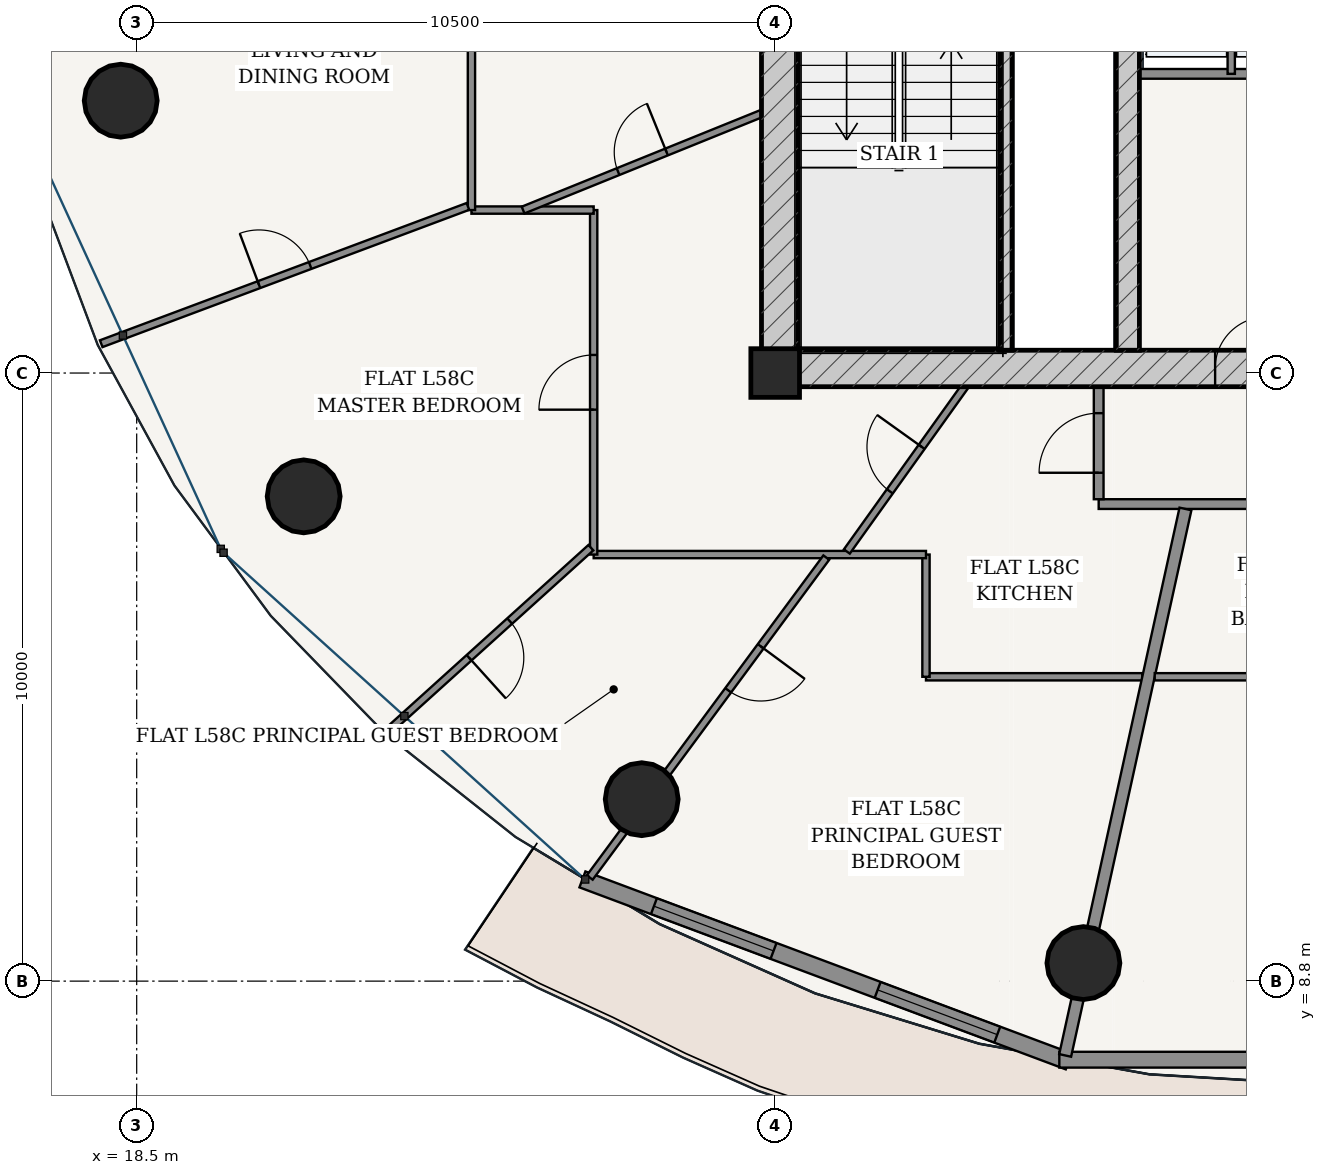
"""IFC4 building model, lengths in metres.
Left out: names, types, materials, properties, quantities, classifications, styles, units other than length and angle.
Written with IfcOpenShell. Run it as: python <this file> out.ifc"""

import sys

from ifc_helpers import new_model, si_unit, direction, frame, frame_2d, origin, origin_2d, place, context, subcontext, project, spatial, rectangle, hollow_circle, extrude, source, transform, mapped, element, fill, save


model = new_model("IFC4")
c1 = context("Model", 3, precision=1e-05, world=origin(), true_north=direction((-0.2419218956, 0.970295726276)))
c2 = subcontext(c1, "Body", "Model", "MODEL_VIEW")
j1 = project(units=[si_unit("LENGTHUNIT", "METRE"), si_unit("PLANEANGLEUNIT", "RADIAN")], contexts=[c1])
p1 = place(None, origin())
s1 = spatial("IfcSite", under=j1, at=p1, CompositionType="ELEMENT")
p2 = place(p1, origin())
s2 = spatial("IfcBuilding", under=s1, at=p2, CompositionType="ELEMENT")
p3 = place(p2, frame((0.0, 0.0, 220.8)))
s3 = spatial("IfcBuildingStorey", under=s2, at=p3, CompositionType="ELEMENT", Elevation=220.8)
p4 = place(p3, frame((29.0, 18.8, 0.0), z_axis=(0.0, 0.0, 1.0), x_axis=(1.0, 0.0, 0.0)))
e1 = element("IfcColumn", 1, at=p4, inside=s3, PredefinedType="COLUMN", context=c2, shape_type="SweptSolid", body=[
    extrude(rectangle(XDim=0.8, YDim=0.8, at=origin_2d()), origin(), (0.0, 0.0, 1.0), 3.7),
])
p5 = place(p3, frame((28.775, 18.875, 0.0), z_axis=(0.0, 0.0, 1.0), x_axis=(1.0, 0.0, 0.0)))
e2 = element("IfcWall", 2, at=p5, inside=s3, PredefinedType="SHEAR", context=c2, shape_type="SweptSolid", body=[
    extrude(rectangle(XDim=18.45, YDim=0.6, at=frame_2d((9.225, 0.0))), origin(), (0.0, 0.0, 1.0), 3.435),
])
p6 = place(p5, frame((7.46, 0.0, 0.0)))
e3 = element("IfcOpeningElement", 3, at=p6, cuts=e2, PredefinedType="OPENING", context=c2, shape_type="SweptSolid", body=[
    extrude(rectangle(XDim=0.85, YDim=2.1, at=frame_2d((0.425, 1.05))), frame((0.0, 0.31, 0.0), z_axis=(0.0, -1.0, 0.0), x_axis=(1.0, 0.0, 0.0)), (0.0, 0.0, 1.0), 0.62),
])
p7 = place(p5, frame((10.54, 0.0, 0.0)))
e4 = element("IfcOpeningElement", 4, at=p7, cuts=e2, PredefinedType="OPENING", context=c2, shape_type="SweptSolid", body=[
    extrude(rectangle(XDim=0.85, YDim=2.1, at=frame_2d((0.425, 1.05))), frame((0.0, 0.31, 0.0), z_axis=(0.0, -1.0, 0.0), x_axis=(1.0, 0.0, 0.0)), (0.0, 0.0, 1.0), 0.62),
])
p8 = place(p3, frame((29.075, 19.175, 0.0), z_axis=(0.0, 0.0, 1.0), x_axis=(0.0, 1.0, 0.0)))
e5 = element("IfcWall", 5, at=p8, inside=s3, PredefinedType="SHEAR", context=c2, shape_type="SweptSolid", body=[
    extrude(rectangle(XDim=15.25, YDim=0.6, at=frame_2d((7.625, 0.0))), origin(), (0.0, 0.0, 1.0), 3.435),
])
p9 = place(p8, frame((9.875, 0.0, 0.0)))
e6 = element("IfcOpeningElement", 6, at=p9, cuts=e5, PredefinedType="OPENING", context=c2, shape_type="SweptSolid", body=[
    extrude(rectangle(XDim=1.5, YDim=2.2, at=frame_2d((0.75, 1.1))), frame((0.0, 0.31, 0.0), z_axis=(0.0, -1.0, 0.0), x_axis=(1.0, 0.0, 0.0)), (0.0, 0.0, 1.0), 0.62),
])
p10 = place(p3, frame((32.795, 19.175, 0.0), z_axis=(0.0, 0.0, 1.0), x_axis=(0.0, 1.0, 0.0)))
e7 = element("IfcWall", 7, at=p10, inside=s3, PredefinedType="SOLIDWALL", context=c2, shape_type="SweptSolid", body=[
    extrude(rectangle(XDim=7.375, YDim=0.2, at=frame_2d((3.688, 0.0))), origin(), (0.0, 0.0, 1.0), 3.435),
])
p11 = place(p3, frame((34.8, 19.175, 0.0), z_axis=(0.0, 0.0, 1.0), x_axis=(0.0, 1.0, 0.0)))
e8 = element("IfcWall", 8, at=p11, inside=s3, PredefinedType="SHEAR", context=c2, shape_type="SweptSolid", body=[
    extrude(rectangle(XDim=15.25, YDim=0.38, at=frame_2d((7.625, 0.0))), origin(), (0.0, 0.0, 1.0), 3.435),
])
p12 = place(p11, frame((7.8, 0.0, 0.0)))
e9 = element("IfcOpeningElement", 9, at=p12, cuts=e8, PredefinedType="OPENING", context=c2, shape_type="SweptSolid", body=[
    extrude(rectangle(XDim=1.05, YDim=2.15, at=frame_2d((0.525, 1.075))), frame((0.0, 0.2, 0.0), z_axis=(0.0, -1.0, 0.0), x_axis=(1.0, 0.0, 0.0)), (0.0, 0.0, 1.0), 0.4),
])
for number, where, z_axis, x_axis in (
    (10, (18.237, 23.279, 0.0), (0.0, 0.0, 1.0), (1.0, 0.0, 0.0)),
    (11, (21.246, 16.772, 0.0), (0.0, 0.0, 1.0), (1.0, 0.0, 0.0)),
    (12, (26.805, 11.792, 0.0), (0.0, 0.0, 1.0), (1.0, 0.0, 0.0)),
    (13, (34.069, 9.097, 0.0), (0.0, 0.0, 1.0), (1.0, 0.0, 0.0)),
):
    element("IfcColumn", number, at=place(p3, frame(where, z_axis=z_axis, x_axis=x_axis)), inside=s3, PredefinedType="COLUMN", context=c2, shape_type="SweptSolid", body=[
        extrude(hollow_circle(Radius=0.6, WallThickness=0.038, at=origin_2d()), origin(), (0.0, 0.0, 1.0), 3.7),
    ])
p13 = place(p3, frame((25.83, 10.473, 0.0), z_axis=(0.0, 0.0, 1.0), x_axis=(0.936556918375, -0.350515532672, 0.0)))
e14 = element("IfcWall", 14, at=p13, inside=s3, PredefinedType="SOLIDWALL", context=c2, shape_type="SweptSolid", body=[
    extrude(rectangle(XDim=8.539, YDim=0.28, at=frame_2d((4.27, 0.0))), origin(), (0.0, 0.0, 1.0), 3.435),
])
p14 = place(p13, frame((1.256, 0.0, 0.85)))
e15 = element("IfcOpeningElement", 15, at=p14, cuts=e14, PredefinedType="OPENING", context=c2, shape_type="SweptSolid", body=[
    extrude(rectangle(XDim=2.1, YDim=1.95, at=frame_2d((1.05, 0.975))), frame((0.0, 0.15, 0.0), z_axis=(0.0, -1.0, 0.0), x_axis=(1.0, 0.0, 0.0)), (0.0, 0.0, 1.0), 0.3),
])
p15 = place(p13, frame((5.184, 0.0, 0.85)))
e16 = element("IfcOpeningElement", 16, at=p15, cuts=e14, PredefinedType="OPENING", context=c2, shape_type="SweptSolid", body=[
    extrude(rectangle(XDim=2.1, YDim=1.95, at=frame_2d((1.05, 0.975))), frame((0.0, 0.15, 0.0), z_axis=(0.0, -1.0, 0.0), x_axis=(1.0, 0.0, 0.0)), (0.0, 0.0, 1.0), 0.3),
])
p16 = place(p3, frame((33.673, 7.508, 0.0), z_axis=(0.0, 0.0, 1.0), x_axis=(1.0, 0.0, 0.0)))
e17 = element("IfcWall", 17, at=p16, inside=s3, PredefinedType="SOLIDWALL", context=c2, shape_type="SweptSolid", body=[
    extrude(rectangle(XDim=8.654, YDim=0.26, at=frame_2d((4.327, 0.0))), origin(), (0.0, 0.0, 1.0), 3.435),
])
p17 = place(p16, frame((3.652, 0.0, 0.0)))
e18 = element("IfcOpeningElement", 18, at=p17, cuts=e17, PredefinedType="OPENING", context=c2, shape_type="SweptSolid", body=[
    extrude(rectangle(XDim=1.35, YDim=2.2, at=frame_2d((0.675, 1.1))), frame((0.0, 0.14, 0.0), z_axis=(0.0, -1.0, 0.0), x_axis=(1.0, 0.0, 0.0)), (0.0, 0.0, 1.0), 0.28),
])
p18 = place(p3, frame((34.99, 23.72, 0.0), z_axis=(0.0, 0.0, 1.0), x_axis=(1.0, 0.0, 0.0)))
e19 = element("IfcWall", 19, at=p18, inside=s3, PredefinedType="PARTITIONING", context=c2, shape_type="SweptSolid", body=[
    extrude(rectangle(XDim=6.02, YDim=0.16, at=frame_2d((3.01, 0.0))), origin(), (0.0, 0.0, 1.0), 3.435),
])
p19 = place(p3, frame((36.5, 23.72, 0.0), z_axis=(0.0, 0.0, 1.0), x_axis=(0.0, 1.0, 0.0)))
e20 = element("IfcWall", 20, at=p19, inside=s3, PredefinedType="PARTITIONING", context=c2, shape_type="SweptSolid", body=[
    extrude(rectangle(XDim=2.56, YDim=0.12, at=frame_2d((1.28, 0.0))), origin(), (0.0, 0.0, 1.0), 3.435),
])
p20 = place(p3, frame((34.32, 16.645, 0.0), z_axis=(0.0, 0.0, 1.0), x_axis=(1.0, 0.0, 0.0)))
e21 = element("IfcWall", 21, at=p20, inside=s3, PredefinedType="PARTITIONING", context=c2, shape_type="SweptSolid", body=[
    extrude(rectangle(XDim=14.835, YDim=0.16, at=frame_2d((7.417, 0.0))), origin(), (0.0, 0.0, 1.0), 2.951),
])
p21 = place(p20, frame((8.973, 0.0, 0.0)))
e22 = element("IfcOpeningElement", 22, at=p21, cuts=e21, PredefinedType="OPENING", context=c2, shape_type="SweptSolid", body=[
    extrude(rectangle(XDim=0.98, YDim=2.2, at=frame_2d((0.49, 1.1))), frame((0.0, 0.09, 0.0), z_axis=(0.0, -1.0, 0.0), x_axis=(1.0, 0.0, 0.0)), (0.0, 0.0, 1.0), 0.18),
])
p22 = place(p3, frame((34.32, 16.725, 0.0), z_axis=(0.0, 0.0, 1.0), x_axis=(0.0, 1.0, 0.0)))
e23 = element("IfcWall", 23, at=p22, inside=s3, PredefinedType="PARTITIONING", context=c2, shape_type="SweptSolid", body=[
    extrude(rectangle(XDim=1.85, YDim=0.16, at=frame_2d((0.925, 0.0))), origin(), (0.0, 0.0, 1.0), 3.435),
])
p23 = place(p22, frame((0.435, 0.0, 0.0)))
e24 = element("IfcOpeningElement", 24, at=p23, cuts=e23, PredefinedType="OPENING", context=c2, shape_type="SweptSolid", body=[
    extrude(rectangle(XDim=0.98, YDim=2.2, at=frame_2d((0.49, 1.1))), frame((0.0, 0.09, 0.0), z_axis=(0.0, -1.0, 0.0), x_axis=(1.0, 0.0, 0.0)), (0.0, 0.0, 1.0), 0.18),
])
p24 = place(p3, frame((35.038, 13.805, 0.0), z_axis=(0.0, 0.0, 1.0), x_axis=(-1.0, 0.0, 0.0)))
e25 = element("IfcWall", 25, at=p24, inside=s3, PredefinedType="PARTITIONING", context=c2, shape_type="SweptSolid", body=[
    extrude(rectangle(XDim=3.558, YDim=0.12, at=frame_2d((1.779, 0.0))), origin(), (0.0, 0.0, 1.0), 2.951),
])
p25 = place(p3, frame((31.48, 13.805, 0.0), z_axis=(0.0, 0.0, 1.0), x_axis=(0.0, 1.0, 0.0)))
e26 = element("IfcWall", 26, at=p25, inside=s3, PredefinedType="PARTITIONING", context=c2, shape_type="SweptSolid", body=[
    extrude(rectangle(XDim=2.01, YDim=0.12, at=frame_2d((1.005, 0.0))), origin(), (0.0, 0.0, 1.0), 3.11),
])
p26 = place(p3, frame((31.48, 15.815, 0.0), z_axis=(0.0, 0.0, 1.0), x_axis=(-1.0, 0.0, 0.0)))
e27 = element("IfcWall", 27, at=p26, inside=s3, PredefinedType="PARTITIONING", context=c2, shape_type="SweptSolid", body=[
    extrude(rectangle(XDim=5.465, YDim=0.12, at=frame_2d((2.732, 0.0))), origin(), (0.0, 0.0, 1.0), 2.951),
])
p27 = place(p3, frame((26.015, 15.815, 0.0), z_axis=(0.0, 0.0, 1.0), x_axis=(0.0, 1.0, 0.0)))
e28 = element("IfcWall", 28, at=p27, inside=s3, PredefinedType="PARTITIONING", context=c2, shape_type="SweptSolid", body=[
    extrude(rectangle(XDim=5.665, YDim=0.12, at=frame_2d((2.833, 0.0))), origin(), (0.0, 0.0, 1.0), 2.951),
])
p28 = place(p27, frame((2.383, 0.0, 0.0)))
e29 = element("IfcOpeningElement", 29, at=p28, cuts=e28, PredefinedType="OPENING", context=c2, shape_type="SweptSolid", body=[
    extrude(rectangle(XDim=0.9, YDim=2.15, at=frame_2d((0.45, 1.075))), frame((0.0, 0.07, 0.0), z_axis=(0.0, -1.0, 0.0), x_axis=(1.0, 0.0, 0.0)), (0.0, 0.0, 1.0), 0.14),
])
p29 = place(p3, frame((26.015, 21.48, 0.0), z_axis=(0.0, 0.0, 1.0), x_axis=(-1.0, 0.0, 0.0)))
e30 = element("IfcWall", 30, at=p29, inside=s3, PredefinedType="PARTITIONING", context=c2, shape_type="SweptSolid", body=[
    extrude(rectangle(XDim=2.01, YDim=0.12, at=frame_2d((1.005, 0.0))), origin(), (0.0, 0.0, 1.0), 3.11),
])
p30 = place(p3, frame((24.005, 21.48, 0.0), z_axis=(0.0, 0.0, 1.0), x_axis=(0.0, 1.0, 0.0)))
e31 = element("IfcWall", 31, at=p30, inside=s3, PredefinedType="PARTITIONING", context=c2, shape_type="SweptSolid", body=[
    extrude(rectangle(XDim=5.218, YDim=0.12, at=frame_2d((2.609, 0.0))), origin(), (0.0, 0.0, 1.0), 2.951),
])
p31 = place(p3, frame((23.947, 21.54, 0.0), z_axis=(0.0, 0.0, 1.0), x_axis=(-0.936534700322, -0.350574892274, 0.0)))
e32 = element("IfcWall", 32, at=p31, inside=s3, PredefinedType="PARTITIONING", context=c2, shape_type="SweptSolid", body=[
    extrude(rectangle(XDim=6.439, YDim=0.12, at=frame_2d((3.219, 0.0))), origin(), (0.0, 0.0, 1.0), 2.951),
])
p32 = place(p31, frame((2.769, 0.0, 0.0)))
e33 = element("IfcOpeningElement", 33, at=p32, cuts=e32, PredefinedType="OPENING", context=c2, shape_type="SweptSolid", body=[
    extrude(rectangle(XDim=0.9, YDim=2.15, at=frame_2d((0.45, 1.075))), frame((0.0, 0.07, 0.0), z_axis=(0.0, -1.0, 0.0), x_axis=(1.0, 0.0, 0.0)), (0.0, 0.0, 1.0), 0.14),
])
p33 = place(p3, frame((25.969, 15.928, 0.0), z_axis=(0.0, 0.0, 1.0), x_axis=(-0.741935446671, -0.670471321514, 0.0)))
e34 = element("IfcWall", 34, at=p33, inside=s3, PredefinedType="PARTITIONING", context=c2, shape_type="SweptSolid", body=[
    extrude(rectangle(XDim=4.499, YDim=0.12, at=frame_2d((2.25, 0.0))), origin(), (0.0, 0.0, 1.0), 2.951),
])
p34 = place(p33, frame((1.8, 0.0, 0.0)))
e35 = element("IfcOpeningElement", 35, at=p34, cuts=e34, PredefinedType="OPENING", context=c2, shape_type="SweptSolid", body=[
    extrude(rectangle(XDim=0.9, YDim=2.15, at=frame_2d((0.45, 1.075))), frame((0.0, 0.07, 0.0), z_axis=(0.0, -1.0, 0.0), x_axis=(1.0, 0.0, 0.0)), (0.0, 0.0, 1.0), 0.14),
])
p35 = place(p3, frame((29.841, 15.765, 0.0), z_axis=(0.0, 0.0, 1.0), x_axis=(-0.594535821787, -0.804069124275, 0.0)))
e36 = element("IfcWall", 36, at=p35, inside=s3, PredefinedType="PARTITIONING", context=c2, shape_type="SweptSolid", body=[
    extrude(rectangle(XDim=6.543, YDim=0.12, at=frame_2d((3.272, 0.0))), origin(), (0.0, 0.0, 1.0), 2.951),
])
p36 = place(p35, frame((1.814, 0.0, 0.0)))
e37 = element("IfcOpeningElement", 37, at=p36, cuts=e36, PredefinedType="OPENING", context=c2, shape_type="SweptSolid", body=[
    extrude(rectangle(XDim=0.9, YDim=2.15, at=frame_2d((0.45, 1.075))), frame((0.0, 0.07, 0.0), z_axis=(0.0, -1.0, 0.0), x_axis=(1.0, 0.0, 0.0)), (0.0, 0.0, 1.0), 0.14),
])
p37 = place(p3, frame((28.775, 23.067, 0.0), z_axis=(0.0, 0.0, 1.0), x_axis=(-0.926976443277, -0.375119545757, 0.0)))
e38 = element("IfcWall", 38, at=p37, inside=s3, PredefinedType="PARTITIONING", context=c2, shape_type="SweptSolid", body=[
    extrude(rectangle(XDim=4.23, YDim=0.12, at=frame_2d((2.115, 0.0))), origin(), (0.0, 0.0, 1.0), 3.435),
])
p38 = place(p37, frame((1.685, 0.0, 0.0)))
e39 = element("IfcOpeningElement", 39, at=p38, cuts=e38, PredefinedType="OPENING", context=c2, shape_type="SweptSolid", body=[
    extrude(rectangle(XDim=0.86, YDim=2.15, at=frame_2d((0.43, 1.075))), frame((0.0, 0.07, 0.0), z_axis=(0.0, -1.0, 0.0), x_axis=(1.0, 0.0, 0.0)), (0.0, 0.0, 1.0), 0.14),
])
p39 = place(p3, frame((32.117, 18.575, 0.0), z_axis=(0.0, 0.0, 1.0), x_axis=(-0.581813438478, -0.813322274874, 0.0)))
e40 = element("IfcWall", 40, at=p39, inside=s3, PredefinedType="PARTITIONING", context=c2, shape_type="SweptSolid", body=[
    extrude(rectangle(XDim=3.331, YDim=0.12, at=frame_2d((1.666, 0.0))), origin(), (0.0, 0.0, 1.0), 3.435),
])
p40 = place(p39, frame((1.216, 0.0, 0.0)))
e41 = element("IfcOpeningElement", 41, at=p40, cuts=e40, PredefinedType="OPENING", context=c2, shape_type="SweptSolid", body=[
    extrude(rectangle(XDim=0.9, YDim=2.15, at=frame_2d((0.45, 1.075))), frame((0.0, 0.07, 0.0), z_axis=(0.0, -1.0, 0.0), x_axis=(1.0, 0.0, 0.0)), (0.0, 0.0, 1.0), 0.14),
])
p41 = place(p3, frame((35.747, 16.565, 0.0), z_axis=(0.0, 0.0, 1.0), x_axis=(-0.214957946814, -0.976623305631, 0.0)))
e42 = element("IfcWall", 42, at=p41, inside=s3, PredefinedType="PARTITIONING", context=c2, shape_type="SweptSolid", body=[
    extrude(rectangle(XDim=9.202, YDim=0.2, at=frame_2d((4.601, 0.0))), origin(), (0.0, 0.0, 1.0), 2.951),
])
p42 = place(p3, frame((51.995, 13.805, 0.0), z_axis=(0.0, 0.0, 1.0), x_axis=(-1.0, 0.0, 0.0)))
e43 = element("IfcWall", 43, at=p42, inside=s3, PredefinedType="PARTITIONING", context=c2, shape_type="SweptSolid", body=[
    extrude(rectangle(XDim=16.753, YDim=0.12, at=frame_2d((8.377, 0.0))), origin(), (0.0, 0.0, 1.0), 2.951),
])
p43 = place(p42, frame((7.442, 0.0, 0.0)))
e44 = element("IfcOpeningElement", 44, at=p43, cuts=e43, PredefinedType="OPENING", context=c2, shape_type="SweptSolid", body=[
    extrude(rectangle(XDim=0.9, YDim=2.15, at=frame_2d((0.45, 1.075))), frame((0.0, 0.07, 0.0), z_axis=(0.0, -1.0, 0.0), x_axis=(1.0, 0.0, 0.0)), (0.0, 0.0, 1.0), 0.14),
])
m1 = source(origin(), c2, "Body", "SweptSolid", [
    extrude(rectangle(XDim=2.1, YDim=1.95, at=frame_2d((1.05, 0.975))), frame((0.0, 0.03, 0.0), z_axis=(0.0, -1.0, 0.0), x_axis=(1.0, 0.0, 0.0)), (0.0, 0.0, 1.0), 0.06),
])
p44 = place(p14, origin())
e45 = element("IfcWindow", 45, at=p44, inside=s3, PartitioningType="SINGLE_PANEL", PredefinedType="WINDOW", context=c2, shape_type="MappedRepresentation", body=[
    mapped(m1, transform((0.0, 0.0, 0.0), scale=1.0)),
])
fill(e15, e45)
p45 = place(p15, origin())
e46 = element("IfcWindow", 46, at=p45, inside=s3, PartitioningType="SINGLE_PANEL", PredefinedType="WINDOW", context=c2, shape_type="MappedRepresentation", body=[
    mapped(m1, transform((0.0, 0.0, 0.0), scale=1.0)),
])
fill(e16, e46)
m2 = source(origin(), c2, "Body", "SweptSolid", [
    extrude(rectangle(XDim=0.85, YDim=2.1, at=frame_2d((0.425, 1.05))), frame((0.0, 0.025, 0.0), z_axis=(0.0, -1.0, 0.0), x_axis=(1.0, 0.0, 0.0)), (0.0, 0.0, 1.0), 0.05),
])
p46 = place(p6, origin())
e47 = element("IfcDoor", 47, at=p46, inside=s3, OperationType="SINGLE_SWING_RIGHT", PredefinedType="DOOR", context=c2, shape_type="MappedRepresentation", body=[
    mapped(m2, transform((0.0, 0.0, 0.0), scale=1.0)),
])
fill(e3, e47)
m3 = source(origin(), c2, "Body", "SweptSolid", [
    extrude(rectangle(XDim=0.98, YDim=2.2, at=frame_2d((0.49, 1.1))), frame((0.0, 0.025, 0.0), z_axis=(0.0, -1.0, 0.0), x_axis=(1.0, 0.0, 0.0)), (0.0, 0.0, 1.0), 0.05),
])
p47 = place(p23, origin())
e48 = element("IfcDoor", 48, at=p47, inside=s3, OperationType="SINGLE_SWING_LEFT", PredefinedType="DOOR", context=c2, shape_type="MappedRepresentation", body=[
    mapped(m3, transform((0.0, 0.0, 0.0), scale=1.0)),
])
fill(e24, e48)
m4 = source(origin(), c2, "Body", "SweptSolid", [
    extrude(rectangle(XDim=0.9, YDim=2.15, at=frame_2d((0.45, 1.075))), frame((0.0, 0.025, 0.0), z_axis=(0.0, -1.0, 0.0), x_axis=(1.0, 0.0, 0.0)), (0.0, 0.0, 1.0), 0.05),
])
p48 = place(p40, frame((0.9, 0.0, 0.0), z_axis=(0.0, 0.0, 1.0), x_axis=(-1.0, 0.0, 0.0)))
e49 = element("IfcDoor", 49, at=p48, inside=s3, OperationType="SINGLE_SWING_RIGHT", PredefinedType="DOOR", context=c2, shape_type="MappedRepresentation", body=[
    mapped(m4, transform((0.0, 0.0, 0.0), scale=1.0)),
])
fill(e41, e49)
p49 = place(p28, origin())
e50 = element("IfcDoor", 50, at=p49, inside=s3, OperationType="SINGLE_SWING_LEFT", PredefinedType="DOOR", context=c2, shape_type="MappedRepresentation", body=[
    mapped(m4, transform((0.0, 0.0, 0.0), scale=1.0)),
])
fill(e29, e50)
p50 = place(p34, origin())
e51 = element("IfcDoor", 51, at=p50, inside=s3, OperationType="SINGLE_SWING_RIGHT", PredefinedType="DOOR", context=c2, shape_type="MappedRepresentation", body=[
    mapped(m4, transform((0.0, 0.0, 0.0), scale=1.0)),
])
fill(e35, e51)
p51 = place(p36, origin())
e52 = element("IfcDoor", 52, at=p51, inside=s3, OperationType="SINGLE_SWING_LEFT", PredefinedType="DOOR", context=c2, shape_type="MappedRepresentation", body=[
    mapped(m4, transform((0.0, 0.0, 0.0), scale=1.0)),
])
fill(e37, e52)
m5 = source(origin(), c2, "Body", "SweptSolid", [
    extrude(rectangle(XDim=0.86, YDim=2.15, at=frame_2d((0.43, 1.075))), frame((0.0, 0.025, 0.0), z_axis=(0.0, -1.0, 0.0), x_axis=(1.0, 0.0, 0.0)), (0.0, 0.0, 1.0), 0.05),
])
p52 = place(p38, frame((0.86, 0.0, 0.0), z_axis=(0.0, 0.0, 1.0), x_axis=(-1.0, 0.0, 0.0)))
e53 = element("IfcDoor", 53, at=p52, inside=s3, OperationType="SINGLE_SWING_RIGHT", PredefinedType="DOOR", context=c2, shape_type="MappedRepresentation", body=[
    mapped(m5, transform((0.0, 0.0, 0.0), scale=1.0)),
])
fill(e39, e53)
p53 = place(p32, frame((0.9, 0.0, 0.0), z_axis=(0.0, 0.0, 1.0), x_axis=(-1.0, 0.0, 0.0)))
e54 = element("IfcDoor", 54, at=p53, inside=s3, OperationType="SINGLE_SWING_LEFT", PredefinedType="DOOR", context=c2, shape_type="MappedRepresentation", body=[
    mapped(m4, transform((0.0, 0.0, 0.0), scale=1.0)),
])
fill(e33, e54)
save(model, sys.argv[1])
